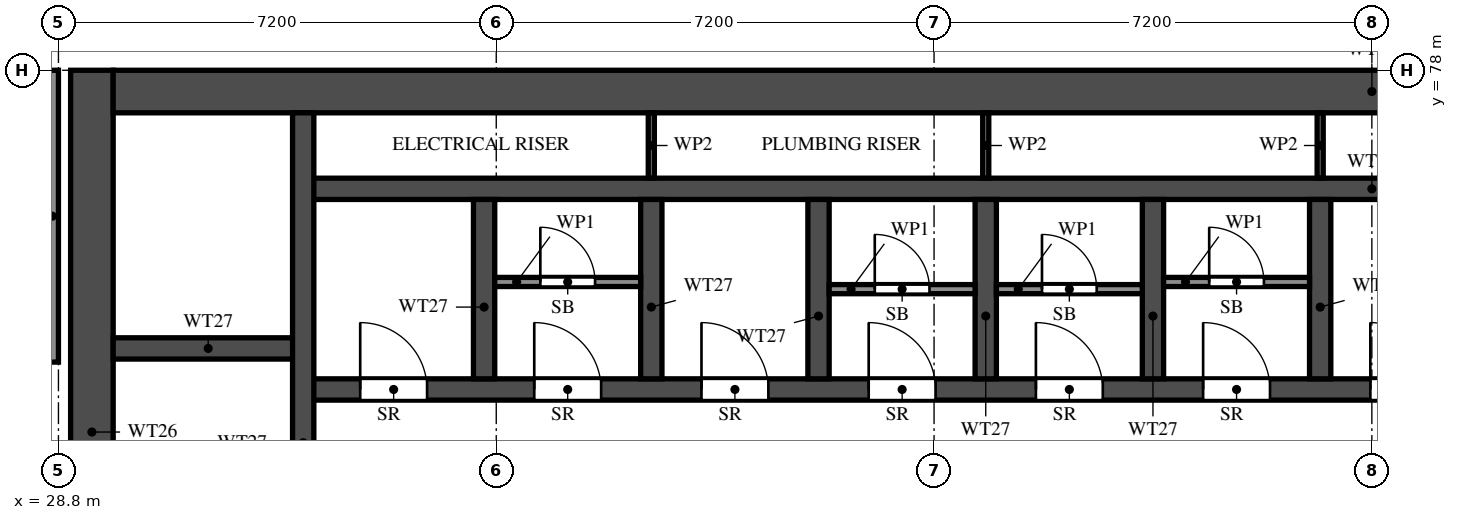
"""IFC4 building model, lengths in metres.
Left out: names, types, materials, properties, quantities, classifications, styles, units other than length and angle.
Written with IfcOpenShell. Run it as: python <this file> out.ifc"""

import sys

from ifc_helpers import new_model, si_unit, direction, frame, frame_2d, origin, place, context, subcontext, project, spatial, rectangle, extrude, element, fill, save


model = new_model("IFC4")
c1 = context("Model", 3, precision=1e-05, world=origin(), true_north=direction((0.0, 1.0)))
c2 = subcontext(c1, "Body", "Model", "MODEL_VIEW")
j1 = project(units=[si_unit("LENGTHUNIT", "METRE"), si_unit("PLANEANGLEUNIT", "RADIAN")], contexts=[c1])
p1 = place(None, origin())
s1 = spatial("IfcSite", under=j1, at=p1, CompositionType="ELEMENT")
p2 = place(p1, origin())
s2 = spatial("IfcBuilding", under=s1, at=p2, CompositionType="ELEMENT")
p3 = place(p2, frame((0.0, 0.0, 113.0)))
s3 = spatial("IfcBuildingStorey", under=s2, at=p3, CompositionType="ELEMENT", Elevation=113.0)
p4 = place(p3, frame((29.35, 66.1, 0.0), z_axis=(0.0, 0.0, 1.0), x_axis=(0.0, 1.0, 0.0)))
e1 = element("IfcWall", 1, at=p4, inside=s3, PredefinedType="SHEAR", context=c2, shape_type="SweptSolid", body=[
    extrude(rectangle(XDim=11.9, YDim=0.7, at=frame_2d((5.95, 0.0))), origin(), (0.0, 0.0, 1.0), 3.2),
])
p5 = place(p3, frame((29.7, 77.65, 0.0), z_axis=(0.0, 0.0, 1.0), x_axis=(1.0, 0.0, 0.0)))
e2 = element("IfcWall", 2, at=p5, inside=s3, PredefinedType="SHEAR", context=c2, shape_type="SweptSolid", body=[
    extrude(rectangle(XDim=41.4, YDim=0.7, at=frame_2d((20.7, 0.0))), origin(), (0.0, 0.0, 1.0), 3.2),
])
p6 = place(p3, frame((32.825, 72.75, 0.0), z_axis=(0.0, 0.0, 1.0), x_axis=(1.0, 0.0, 0.0)))
e3 = element("IfcWall", 3, at=p6, inside=s3, PredefinedType="SHEAR", context=c2, shape_type="SweptSolid", body=[
    extrude(rectangle(XDim=35.15, YDim=0.35, at=frame_2d((17.575, 0.0))), origin(), (0.0, 0.0, 1.0), 3.2),
])
p7 = place(p6, frame((19.8, 0.0, 0.0)))
e4 = element("IfcOpeningElement", 4, at=p7, cuts=e3, PredefinedType="OPENING", context=c2, shape_type="SweptSolid", body=[
    extrude(rectangle(XDim=1.1, YDim=2.1, at=frame_2d((0.55, 1.05))), frame((0.0, 0.185, 0.0), z_axis=(0.0, -1.0, 0.0), x_axis=(1.0, 0.0, 0.0)), (0.0, 0.0, 1.0), 0.37),
])
p8 = place(p6, frame((27.7, 0.0, 0.0)))
e5 = element("IfcOpeningElement", 5, at=p8, cuts=e3, PredefinedType="OPENING", context=c2, shape_type="SweptSolid", body=[
    extrude(rectangle(XDim=1.1, YDim=2.1, at=frame_2d((0.55, 1.05))), frame((0.0, 0.185, 0.0), z_axis=(0.0, -1.0, 0.0), x_axis=(1.0, 0.0, 0.0)), (0.0, 0.0, 1.0), 0.37),
])
p9 = place(p6, frame((30.3, 0.0, 0.0)))
e6 = element("IfcOpeningElement", 6, at=p9, cuts=e3, PredefinedType="OPENING", context=c2, shape_type="SweptSolid", body=[
    extrude(rectangle(XDim=1.1, YDim=2.1, at=frame_2d((0.55, 1.05))), frame((0.0, 0.185, 0.0), z_axis=(0.0, -1.0, 0.0), x_axis=(1.0, 0.0, 0.0)), (0.0, 0.0, 1.0), 0.37),
])
p10 = place(p6, frame((3.8, 0.0, 0.0)))
e7 = element("IfcOpeningElement", 7, at=p10, cuts=e3, PredefinedType="OPENING", context=c2, shape_type="SweptSolid", body=[
    extrude(rectangle(XDim=1.1, YDim=2.1, at=frame_2d((0.55, 1.05))), frame((0.0, 0.185, 0.0), z_axis=(0.0, -1.0, 0.0), x_axis=(1.0, 0.0, 0.0)), (0.0, 0.0, 1.0), 0.37),
])
p11 = place(p6, frame((6.55, 0.0, 0.0)))
e8 = element("IfcOpeningElement", 8, at=p11, cuts=e3, PredefinedType="OPENING", context=c2, shape_type="SweptSolid", body=[
    extrude(rectangle(XDim=1.1, YDim=2.1, at=frame_2d((0.55, 1.05))), frame((0.0, 0.185, 0.0), z_axis=(0.0, -1.0, 0.0), x_axis=(1.0, 0.0, 0.0)), (0.0, 0.0, 1.0), 0.37),
])
p12 = place(p6, frame((9.3, 0.0, 0.0)))
e9 = element("IfcOpeningElement", 9, at=p12, cuts=e3, PredefinedType="OPENING", context=c2, shape_type="SweptSolid", body=[
    extrude(rectangle(XDim=1.1, YDim=2.1, at=frame_2d((0.55, 1.05))), frame((0.0, 0.185, 0.0), z_axis=(0.0, -1.0, 0.0), x_axis=(1.0, 0.0, 0.0)), (0.0, 0.0, 1.0), 0.37),
])
p13 = place(p6, frame((12.05, 0.0, 0.0)))
e10 = element("IfcOpeningElement", 10, at=p13, cuts=e3, PredefinedType="OPENING", context=c2, shape_type="SweptSolid", body=[
    extrude(rectangle(XDim=1.1, YDim=2.1, at=frame_2d((0.55, 1.05))), frame((0.0, 0.185, 0.0), z_axis=(0.0, -1.0, 0.0), x_axis=(1.0, 0.0, 0.0)), (0.0, 0.0, 1.0), 0.37),
])
p14 = place(p6, frame((14.8, 0.0, 0.0)))
e11 = element("IfcOpeningElement", 11, at=p14, cuts=e3, PredefinedType="OPENING", context=c2, shape_type="SweptSolid", body=[
    extrude(rectangle(XDim=1.1, YDim=2.1, at=frame_2d((0.55, 1.05))), frame((0.0, 0.185, 0.0), z_axis=(0.0, -1.0, 0.0), x_axis=(1.0, 0.0, 0.0)), (0.0, 0.0, 1.0), 0.37),
])
p15 = place(p6, frame((17.55, 0.0, 0.0)))
e12 = element("IfcOpeningElement", 12, at=p15, cuts=e3, PredefinedType="OPENING", context=c2, shape_type="SweptSolid", body=[
    extrude(rectangle(XDim=1.1, YDim=2.1, at=frame_2d((0.55, 1.05))), frame((0.0, 0.185, 0.0), z_axis=(0.0, -1.0, 0.0), x_axis=(1.0, 0.0, 0.0)), (0.0, 0.0, 1.0), 0.37),
])
p16 = place(p6, frame((0.938, 0.0, 0.0)))
e13 = element("IfcOpeningElement", 13, at=p16, cuts=e3, PredefinedType="OPENING", context=c2, shape_type="SweptSolid", body=[
    extrude(rectangle(XDim=1.1, YDim=2.1, at=frame_2d((0.55, 1.05))), frame((0.0, 0.185, 0.0), z_axis=(0.0, -1.0, 0.0), x_axis=(1.0, 0.0, 0.0)), (0.0, 0.0, 1.0), 0.37),
])
p17 = place(p3, frame((32.825, 76.05, 0.0), z_axis=(0.0, 0.0, 1.0), x_axis=(1.0, 0.0, 0.0)))
e14 = element("IfcWall", 14, at=p17, inside=s3, PredefinedType="SHEAR", context=c2, shape_type="SweptSolid", body=[
    extrude(rectangle(XDim=35.15, YDim=0.35, at=frame_2d((17.575, 0.0))), origin(), (0.0, 0.0, 1.0), 3.2),
])
p18 = place(p3, frame((29.7, 73.425, 0.0), z_axis=(0.0, 0.0, 1.0), x_axis=(1.0, 0.0, 0.0)))
e15 = element("IfcWall", 15, at=p18, inside=s3, PredefinedType="SHEAR", context=c2, shape_type="SweptSolid", body=[
    extrude(rectangle(XDim=3.125, YDim=0.35, at=frame_2d((1.562, 0.0))), origin(), (0.0, 0.0, 1.0), 3.2),
])
p19 = place(p3, frame((32.825, 66.45, 0.0), z_axis=(0.0, 0.0, 1.0), x_axis=(0.0, 1.0, 0.0)))
e16 = element("IfcWall", 16, at=p19, inside=s3, PredefinedType="SHEAR", context=c2, shape_type="SweptSolid", body=[
    extrude(rectangle(XDim=10.85, YDim=0.35, at=frame_2d((5.425, 0.0))), origin(), (0.0, 0.0, 1.0), 3.2),
])
for number, where, z_axis, x_axis in (
    (17, (35.8, 72.925, 0.0), (0.0, 0.0, 1.0), (0.0, 1.0, 0.0)),
    (18, (38.55, 72.925, 0.0), (0.0, 0.0, 1.0), (0.0, 1.0, 0.0)),
    (19, (41.3, 72.925, 0.0), (0.0, 0.0, 1.0), (0.0, 1.0, 0.0)),
    (20, (44.05, 72.925, 0.0), (0.0, 0.0, 1.0), (0.0, 1.0, 0.0)),
    (21, (46.8, 72.925, 0.0), (0.0, 0.0, 1.0), (0.0, 1.0, 0.0)),
    (22, (49.55, 72.925, 0.0), (0.0, 0.0, 1.0), (0.0, 1.0, 0.0)),
):
    element("IfcWall", number, at=place(p3, frame(where, z_axis=z_axis, x_axis=x_axis)), inside=s3, PredefinedType="SHEAR", context=c2, shape_type="SweptSolid", body=[
        extrude(rectangle(XDim=2.95, YDim=0.35, at=frame_2d((1.475, 0.0))), origin(), (0.0, 0.0, 1.0), 3.2),
    ])
p20 = place(p3, frame((35.975, 74.518, 0.0), z_axis=(0.0, 0.0, 1.0), x_axis=(1.0, 0.0, 0.0)))
e23 = element("IfcWall", 23, at=p20, inside=s3, PredefinedType="PARTITIONING", context=c2, shape_type="SweptSolid", body=[
    extrude(rectangle(XDim=2.4, YDim=0.15, at=frame_2d((1.2, 0.0))), origin(), (0.0, 0.0, 1.0), 3.2),
])
p21 = place(p20, frame((0.75, 0.0, 0.0)))
e24 = element("IfcOpeningElement", 24, at=p21, cuts=e23, PredefinedType="OPENING", context=c2, shape_type="SweptSolid", body=[
    extrude(rectangle(XDim=0.9, YDim=2.1, at=frame_2d((0.45, 1.05))), frame((0.0, 0.085, 0.0), z_axis=(0.0, -1.0, 0.0), x_axis=(1.0, 0.0, 0.0)), (0.0, 0.0, 1.0), 0.17),
])
p22 = place(p3, frame((41.475, 74.4, 0.0), z_axis=(0.0, 0.0, 1.0), x_axis=(1.0, 0.0, 0.0)))
e25 = element("IfcWall", 25, at=p22, inside=s3, PredefinedType="PARTITIONING", context=c2, shape_type="SweptSolid", body=[
    extrude(rectangle(XDim=2.4, YDim=0.15, at=frame_2d((1.2, 0.0))), origin(), (0.0, 0.0, 1.0), 3.2),
])
p23 = place(p22, frame((0.75, 0.0, 0.0)))
e26 = element("IfcOpeningElement", 26, at=p23, cuts=e25, PredefinedType="OPENING", context=c2, shape_type="SweptSolid", body=[
    extrude(rectangle(XDim=0.9, YDim=2.1, at=frame_2d((0.45, 1.05))), frame((0.0, 0.085, 0.0), z_axis=(0.0, -1.0, 0.0), x_axis=(1.0, 0.0, 0.0)), (0.0, 0.0, 1.0), 0.17),
])
p24 = place(p3, frame((44.225, 74.4, 0.0), z_axis=(0.0, 0.0, 1.0), x_axis=(1.0, 0.0, 0.0)))
e27 = element("IfcWall", 27, at=p24, inside=s3, PredefinedType="PARTITIONING", context=c2, shape_type="SweptSolid", body=[
    extrude(rectangle(XDim=2.4, YDim=0.15, at=frame_2d((1.2, 0.0))), origin(), (0.0, 0.0, 1.0), 3.2),
])
p25 = place(p24, frame((0.75, 0.0, 0.0)))
e28 = element("IfcOpeningElement", 28, at=p25, cuts=e27, PredefinedType="OPENING", context=c2, shape_type="SweptSolid", body=[
    extrude(rectangle(XDim=0.9, YDim=2.1, at=frame_2d((0.45, 1.05))), frame((0.0, 0.085, 0.0), z_axis=(0.0, -1.0, 0.0), x_axis=(1.0, 0.0, 0.0)), (0.0, 0.0, 1.0), 0.17),
])
p26 = place(p3, frame((46.975, 74.518, 0.0), z_axis=(0.0, 0.0, 1.0), x_axis=(1.0, 0.0, 0.0)))
e29 = element("IfcWall", 29, at=p26, inside=s3, PredefinedType="PARTITIONING", context=c2, shape_type="SweptSolid", body=[
    extrude(rectangle(XDim=2.4, YDim=0.15, at=frame_2d((1.2, 0.0))), origin(), (0.0, 0.0, 1.0), 3.2),
])
p27 = place(p26, frame((0.75, 0.0, 0.0)))
e30 = element("IfcOpeningElement", 30, at=p27, cuts=e29, PredefinedType="OPENING", context=c2, shape_type="SweptSolid", body=[
    extrude(rectangle(XDim=0.9, YDim=2.1, at=frame_2d((0.45, 1.05))), frame((0.0, 0.085, 0.0), z_axis=(0.0, -1.0, 0.0), x_axis=(1.0, 0.0, 0.0)), (0.0, 0.0, 1.0), 0.17),
])
for number, where, z_axis, x_axis in (
    (31, (38.55, 76.225, 0.0), (0.0, 0.0, 1.0), (0.0, 1.0, 0.0)),
    (32, (44.05, 76.225, 0.0), (0.0, 0.0, 1.0), (0.0, 1.0, 0.0)),
    (33, (49.55, 76.225, 0.0), (0.0, 0.0, 1.0), (0.0, 1.0, 0.0)),
):
    element("IfcWall", number, at=place(p3, frame(where, z_axis=z_axis, x_axis=x_axis)), inside=s3, PredefinedType="PARTITIONING", context=c2, shape_type="SweptSolid", body=[
        extrude(rectangle(XDim=1.075, YDim=0.1, at=frame_2d((0.538, 0.0))), origin(), (0.0, 0.0, 1.0), 3.2),
    ])
p28 = place(p3, frame((28.7, 73.2, 0.0), z_axis=(0.0, 0.0, 1.0), x_axis=(0.0, 1.0, 0.0)))
e34 = element("IfcWall", 34, at=p28, inside=s3, PredefinedType="SOLIDWALL", context=c2, shape_type="SweptSolid", body=[
    extrude(rectangle(XDim=4.8, YDim=0.2, at=frame_2d((2.4, 0.0))), origin(), (0.0, 0.0, 1.0), 3.2),
])
p29 = place(p10, origin())
e35 = element("IfcDoor", 35, at=p29, inside=s3, OperationType="SINGLE_SWING_LEFT", PredefinedType="DOOR", context=c2, shape_type="SweptSolid", body=[
    extrude(rectangle(XDim=1.1, YDim=2.1, at=frame_2d((0.55, 1.05))), frame((0.0, 0.025, 0.0), z_axis=(0.0, -1.0, 0.0), x_axis=(1.0, 0.0, 0.0)), (0.0, 0.0, 1.0), 0.05),
])
fill(e7, e35)
p30 = place(p21, origin())
e36 = element("IfcDoor", 36, at=p30, inside=s3, OperationType="SINGLE_SWING_RIGHT", PredefinedType="DOOR", context=c2, shape_type="SweptSolid", body=[
    extrude(rectangle(XDim=0.9, YDim=2.1, at=frame_2d((0.45, 1.05))), frame((0.0, 0.025, 0.0), z_axis=(0.0, -1.0, 0.0), x_axis=(1.0, 0.0, 0.0)), (0.0, 0.0, 1.0), 0.05),
])
fill(e24, e36)
p31 = place(p11, origin())
e37 = element("IfcDoor", 37, at=p31, inside=s3, OperationType="SINGLE_SWING_RIGHT", PredefinedType="DOOR", context=c2, shape_type="SweptSolid", body=[
    extrude(rectangle(XDim=1.1, YDim=2.1, at=frame_2d((0.55, 1.05))), frame((0.0, 0.025, 0.0), z_axis=(0.0, -1.0, 0.0), x_axis=(1.0, 0.0, 0.0)), (0.0, 0.0, 1.0), 0.05),
])
fill(e8, e37)
p32 = place(p12, origin())
e38 = element("IfcDoor", 38, at=p32, inside=s3, OperationType="SINGLE_SWING_LEFT", PredefinedType="DOOR", context=c2, shape_type="SweptSolid", body=[
    extrude(rectangle(XDim=1.1, YDim=2.1, at=frame_2d((0.55, 1.05))), frame((0.0, 0.025, 0.0), z_axis=(0.0, -1.0, 0.0), x_axis=(1.0, 0.0, 0.0)), (0.0, 0.0, 1.0), 0.05),
])
fill(e9, e38)
p33 = place(p23, origin())
e39 = element("IfcDoor", 39, at=p33, inside=s3, OperationType="SINGLE_SWING_LEFT", PredefinedType="DOOR", context=c2, shape_type="SweptSolid", body=[
    extrude(rectangle(XDim=0.9, YDim=2.1, at=frame_2d((0.45, 1.05))), frame((0.0, 0.025, 0.0), z_axis=(0.0, -1.0, 0.0), x_axis=(1.0, 0.0, 0.0)), (0.0, 0.0, 1.0), 0.05),
])
fill(e26, e39)
p34 = place(p13, origin())
e40 = element("IfcDoor", 40, at=p34, inside=s3, OperationType="SINGLE_SWING_RIGHT", PredefinedType="DOOR", context=c2, shape_type="SweptSolid", body=[
    extrude(rectangle(XDim=1.1, YDim=2.1, at=frame_2d((0.55, 1.05))), frame((0.0, 0.025, 0.0), z_axis=(0.0, -1.0, 0.0), x_axis=(1.0, 0.0, 0.0)), (0.0, 0.0, 1.0), 0.05),
])
fill(e10, e40)
p35 = place(p25, origin())
e41 = element("IfcDoor", 41, at=p35, inside=s3, OperationType="SINGLE_SWING_RIGHT", PredefinedType="DOOR", context=c2, shape_type="SweptSolid", body=[
    extrude(rectangle(XDim=0.9, YDim=2.1, at=frame_2d((0.45, 1.05))), frame((0.0, 0.025, 0.0), z_axis=(0.0, -1.0, 0.0), x_axis=(1.0, 0.0, 0.0)), (0.0, 0.0, 1.0), 0.05),
])
fill(e28, e41)
p36 = place(p14, origin())
e42 = element("IfcDoor", 42, at=p36, inside=s3, OperationType="SINGLE_SWING_LEFT", PredefinedType="DOOR", context=c2, shape_type="SweptSolid", body=[
    extrude(rectangle(XDim=1.1, YDim=2.1, at=frame_2d((0.55, 1.05))), frame((0.0, 0.025, 0.0), z_axis=(0.0, -1.0, 0.0), x_axis=(1.0, 0.0, 0.0)), (0.0, 0.0, 1.0), 0.05),
])
fill(e11, e42)
p37 = place(p27, origin())
e43 = element("IfcDoor", 43, at=p37, inside=s3, OperationType="SINGLE_SWING_RIGHT", PredefinedType="DOOR", context=c2, shape_type="SweptSolid", body=[
    extrude(rectangle(XDim=0.9, YDim=2.1, at=frame_2d((0.45, 1.05))), frame((0.0, 0.025, 0.0), z_axis=(0.0, -1.0, 0.0), x_axis=(1.0, 0.0, 0.0)), (0.0, 0.0, 1.0), 0.05),
])
fill(e30, e43)
p38 = place(p15, origin())
e44 = element("IfcDoor", 44, at=p38, inside=s3, OperationType="SINGLE_SWING_RIGHT", PredefinedType="DOOR", context=c2, shape_type="SweptSolid", body=[
    extrude(rectangle(XDim=1.1, YDim=2.1, at=frame_2d((0.55, 1.05))), frame((0.0, 0.025, 0.0), z_axis=(0.0, -1.0, 0.0), x_axis=(1.0, 0.0, 0.0)), (0.0, 0.0, 1.0), 0.05),
])
fill(e12, e44)
p39 = place(p16, origin())
e45 = element("IfcDoor", 45, at=p39, inside=s3, OperationType="SINGLE_SWING_LEFT", PredefinedType="DOOR", context=c2, shape_type="SweptSolid", body=[
    extrude(rectangle(XDim=1.1, YDim=2.1, at=frame_2d((0.55, 1.05))), frame((0.0, 0.025, 0.0), z_axis=(0.0, -1.0, 0.0), x_axis=(1.0, 0.0, 0.0)), (0.0, 0.0, 1.0), 0.05),
])
fill(e13, e45)
save(model, sys.argv[1])
